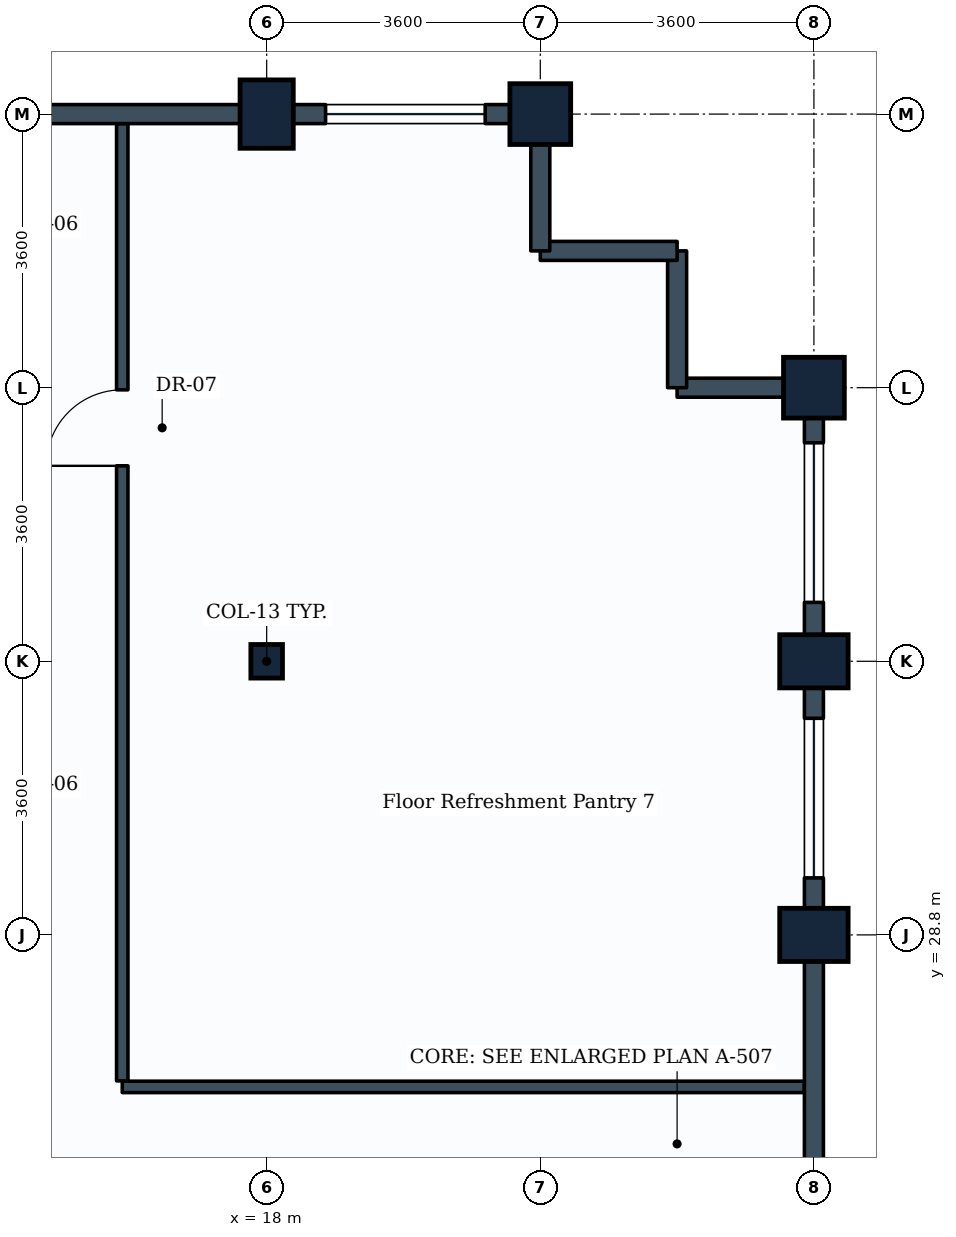
"""IFC4 building model, lengths in metres.
Left out: names, types, materials, properties, quantities, classifications, styles, units other than length and angle.
Written with IfcOpenShell. Run it as: python <this file> out.ifc"""

import sys

from ifc_helpers import new_model, si_unit, direction, frame, frame_2d, origin, origin_2d, place, context, subcontext, project, spatial, rectangle, i_section, extrude, element, fill, save


model = new_model("IFC4")
c1 = context("Model", 3, precision=1e-05, world=origin(), true_north=direction((0.0, 1.0)))
c2 = subcontext(c1, "Body", "Model", "MODEL_VIEW")
j1 = project(units=[si_unit("LENGTHUNIT", "METRE"), si_unit("PLANEANGLEUNIT", "RADIAN")], contexts=[c1])
p1 = place(None, origin())
s1 = spatial("IfcSite", under=j1, at=p1, CompositionType="ELEMENT")
p2 = place(p1, origin())
s2 = spatial("IfcBuilding", under=s1, at=p2, CompositionType="ELEMENT")
p3 = place(p2, frame((0.0, 0.0, 186.2)))
s3 = spatial("IfcBuildingStorey", under=s2, at=p3, CompositionType="ELEMENT", Elevation=186.2)
p4 = place(p3, frame((18.0, 32.4, 0.0), z_axis=(0.0, 0.0, 1.0), x_axis=(1.0, 0.0, 0.0)))
e1 = element("IfcColumn", 1, at=p4, inside=s3, PredefinedType="COLUMN", context=c2, shape_type="SweptSolid", body=[
    extrude(i_section(OverallWidth=0.416, OverallDepth=0.442, WebThickness=0.025, FlangeThickness=0.041, FilletRadius=0.015, at=origin_2d()), origin(), (0.0, 0.0, 1.0), 3.8),
])
p5 = place(p3, frame((18.0, 39.6, 0.0), z_axis=(0.0, 0.0, 1.0), x_axis=(1.0, 0.0, 0.0)))
e2 = element("IfcColumn", 2, at=p5, inside=s3, PredefinedType="COLUMN", context=c2, shape_type="SweptSolid", body=[
    extrude(rectangle(XDim=0.7, YDim=0.9, at=origin_2d()), origin(), (0.0, 0.0, 1.0), 3.8),
])
p6 = place(p3, frame((21.6, 39.6, 0.0), z_axis=(0.0, 0.0, 1.0), x_axis=(1.0, 0.0, 0.0)))
e3 = element("IfcColumn", 3, at=p6, inside=s3, PredefinedType="COLUMN", context=c2, shape_type="SweptSolid", body=[
    extrude(rectangle(XDim=0.8, YDim=0.8, at=origin_2d()), origin(), (0.0, 0.0, 1.0), 3.8),
])
for number, where, z_axis, x_axis in (
    (4, (25.2, 28.8, 0.0), (0.0, 0.0, 1.0), (0.0, 1.0, 0.0)),
    (5, (25.2, 32.4, 0.0), (0.0, 0.0, 1.0), (0.0, 1.0, 0.0)),
):
    element("IfcColumn", number, at=place(p3, frame(where, z_axis=z_axis, x_axis=x_axis)), inside=s3, PredefinedType="COLUMN", context=c2, shape_type="SweptSolid", body=[
        extrude(rectangle(XDim=0.7, YDim=0.9, at=origin_2d()), origin(), (0.0, 0.0, 1.0), 3.8),
    ])
p7 = place(p3, frame((25.2, 36.0, 0.0), z_axis=(0.0, 0.0, 1.0), x_axis=(0.0, 1.0, 0.0)))
e6 = element("IfcColumn", 6, at=p7, inside=s3, PredefinedType="COLUMN", context=c2, shape_type="SweptSolid", body=[
    extrude(rectangle(XDim=0.8, YDim=0.8, at=origin_2d()), origin(), (0.0, 0.0, 1.0), 3.8),
])
p8 = place(p3, frame((25.2, 25.2, 0.0), z_axis=(0.0, 0.0, 1.0), x_axis=(0.0, 1.0, 0.0)))
e7 = element("IfcWall", 7, at=p8, inside=s3, PredefinedType="STANDARD", context=c2, shape_type="SweptSolid", body=[
    extrude(rectangle(XDim=3.6, YDim=0.25, at=frame_2d((1.8, 0.0))), origin(), (0.0, 0.0, 1.0), 2.93),
])
p9 = place(p3, frame((25.2, 28.8, 0.0), z_axis=(0.0, 0.0, 1.0), x_axis=(0.0, 1.0, 0.0)))
e8 = element("IfcWall", 8, at=p9, inside=s3, PredefinedType="STANDARD", context=c2, shape_type="SweptSolid", body=[
    extrude(rectangle(XDim=3.6, YDim=0.25, at=frame_2d((1.8, 0.0))), origin(), (0.0, 0.0, 1.0), 2.93),
])
p10 = place(p9, frame((0.75, 0.0, 0.85)))
e9 = element("IfcOpeningElement", 9, at=p10, cuts=e8, PredefinedType="OPENING", context=c2, shape_type="SweptSolid", body=[
    extrude(rectangle(XDim=2.1, YDim=1.35, at=frame_2d((1.05, 0.675))), frame((0.0, 0.135, 0.0), z_axis=(0.0, -1.0, 0.0), x_axis=(1.0, 0.0, 0.0)), (0.0, 0.0, 1.0), 0.27),
])
p11 = place(p3, frame((25.2, 32.4, 0.0), z_axis=(0.0, 0.0, 1.0), x_axis=(0.0, 1.0, 0.0)))
e10 = element("IfcWall", 10, at=p11, inside=s3, PredefinedType="STANDARD", context=c2, shape_type="SweptSolid", body=[
    extrude(rectangle(XDim=3.6, YDim=0.25, at=frame_2d((1.8, 0.0))), origin(), (0.0, 0.0, 1.0), 2.93),
])
p12 = place(p11, frame((0.775, 0.0, 0.85)))
e11 = element("IfcOpeningElement", 11, at=p12, cuts=e10, PredefinedType="OPENING", context=c2, shape_type="SweptSolid", body=[
    extrude(rectangle(XDim=2.1, YDim=1.35, at=frame_2d((1.05, 0.675))), frame((0.0, 0.135, 0.0), z_axis=(0.0, -1.0, 0.0), x_axis=(1.0, 0.0, 0.0)), (0.0, 0.0, 1.0), 0.27),
])
p13 = place(p3, frame((23.4, 36.0, 0.0), z_axis=(0.0, 0.0, 1.0), x_axis=(1.0, 0.0, 0.0)))
e12 = element("IfcWall", 12, at=p13, inside=s3, PredefinedType="STANDARD", context=c2, shape_type="SweptSolid", body=[
    extrude(rectangle(XDim=1.8, YDim=0.25, at=frame_2d((0.9, 0.0))), origin(), (0.0, 0.0, 1.0), 2.93),
])
p14 = place(p3, frame((23.4, 36.0, 0.0), z_axis=(0.0, 0.0, 1.0), x_axis=(0.0, 1.0, 0.0)))
e13 = element("IfcWall", 13, at=p14, inside=s3, PredefinedType="STANDARD", context=c2, shape_type="SweptSolid", body=[
    extrude(rectangle(XDim=1.8, YDim=0.25, at=frame_2d((0.9, 0.0))), origin(), (0.0, 0.0, 1.0), 3.535),
])
p15 = place(p3, frame((21.6, 37.8, 0.0), z_axis=(0.0, 0.0, 1.0), x_axis=(1.0, 0.0, 0.0)))
e14 = element("IfcWall", 14, at=p15, inside=s3, PredefinedType="STANDARD", context=c2, shape_type="SweptSolid", body=[
    extrude(rectangle(XDim=1.8, YDim=0.25, at=frame_2d((0.9, 0.0))), origin(), (0.0, 0.0, 1.0), 3.535),
])
p16 = place(p3, frame((21.6, 37.8, 0.0), z_axis=(0.0, 0.0, 1.0), x_axis=(0.0, 1.0, 0.0)))
e15 = element("IfcWall", 15, at=p16, inside=s3, PredefinedType="STANDARD", context=c2, shape_type="SweptSolid", body=[
    extrude(rectangle(XDim=1.8, YDim=0.25, at=frame_2d((0.9, 0.0))), origin(), (0.0, 0.0, 1.0), 2.93),
])
p17 = place(p3, frame((18.0, 39.6, 0.0), z_axis=(0.0, 0.0, 1.0), x_axis=(1.0, 0.0, 0.0)))
e16 = element("IfcWall", 16, at=p17, inside=s3, PredefinedType="STANDARD", context=c2, shape_type="SweptSolid", body=[
    extrude(rectangle(XDim=3.6, YDim=0.25, at=frame_2d((1.8, 0.0))), origin(), (0.0, 0.0, 1.0), 2.93),
])
p18 = place(p17, frame((0.775, 0.0, 0.85)))
e17 = element("IfcOpeningElement", 17, at=p18, cuts=e16, PredefinedType="OPENING", context=c2, shape_type="SweptSolid", body=[
    extrude(rectangle(XDim=2.1, YDim=1.35, at=frame_2d((1.05, 0.675))), frame((0.0, 0.135, 0.0), z_axis=(0.0, -1.0, 0.0), x_axis=(1.0, 0.0, 0.0)), (0.0, 0.0, 1.0), 0.27),
])
p19 = place(p3, frame((14.4, 39.6, 0.0), z_axis=(0.0, 0.0, 1.0), x_axis=(1.0, 0.0, 0.0)))
e18 = element("IfcWall", 18, at=p19, inside=s3, PredefinedType="STANDARD", context=c2, shape_type="SweptSolid", body=[
    extrude(rectangle(XDim=3.6, YDim=0.25, at=frame_2d((1.8, 0.0))), origin(), (0.0, 0.0, 1.0), 2.93),
])
p20 = place(p3, frame((16.1, 26.8, 0.0), z_axis=(0.0, 0.0, 1.0), x_axis=(1.0, 0.0, 0.0)))
e19 = element("IfcWall", 19, at=p20, inside=s3, PredefinedType="PARTITIONING", context=c2, shape_type="SweptSolid", body=[
    extrude(rectangle(XDim=8.971, YDim=0.15, at=frame_2d((4.485, 0.0))), origin(), (0.0, 0.0, 1.0), 2.93),
])
p21 = place(p3, frame((16.1, 26.879, 0.0), z_axis=(0.0, 0.0, 1.0), x_axis=(0.0, 1.0, 0.0)))
e20 = element("IfcWall", 20, at=p21, inside=s3, PredefinedType="PARTITIONING", context=c2, shape_type="SweptSolid", body=[
    extrude(rectangle(XDim=12.592, YDim=0.15, at=frame_2d((6.296, 0.0))), origin(), (0.0, 0.0, 1.0), 2.93),
])
p22 = place(p21, frame((8.093, 0.0, 0.0)))
e21 = element("IfcOpeningElement", 21, at=p22, cuts=e20, PredefinedType="OPENING", context=c2, shape_type="SweptSolid", body=[
    extrude(rectangle(XDim=1.0, YDim=2.1, at=frame_2d((0.5, 1.05))), frame((0.0, 0.085, 0.0), z_axis=(0.0, -1.0, 0.0), x_axis=(1.0, 0.0, 0.0)), (0.0, 0.0, 1.0), 0.17),
])
p23 = place(p10, origin())
e22 = element("IfcWindow", 22, at=p23, inside=s3, PartitioningType="SINGLE_PANEL", PredefinedType="WINDOW", context=c2, shape_type="SweptSolid", body=[
    extrude(rectangle(XDim=2.1, YDim=1.35, at=frame_2d((1.05, 0.675))), frame((0.0, 0.03, 0.0), z_axis=(0.0, -1.0, 0.0), x_axis=(1.0, 0.0, 0.0)), (0.0, 0.0, 1.0), 0.06),
])
fill(e9, e22)
p24 = place(p12, origin())
e23 = element("IfcWindow", 23, at=p24, inside=s3, PartitioningType="SINGLE_PANEL", PredefinedType="WINDOW", context=c2, shape_type="SweptSolid", body=[
    extrude(rectangle(XDim=2.1, YDim=1.35, at=frame_2d((1.05, 0.675))), frame((0.0, 0.03, 0.0), z_axis=(0.0, -1.0, 0.0), x_axis=(1.0, 0.0, 0.0)), (0.0, 0.0, 1.0), 0.06),
])
fill(e11, e23)
p25 = place(p18, origin())
e24 = element("IfcWindow", 24, at=p25, inside=s3, PartitioningType="SINGLE_PANEL", PredefinedType="WINDOW", context=c2, shape_type="SweptSolid", body=[
    extrude(rectangle(XDim=2.1, YDim=1.35, at=frame_2d((1.05, 0.675))), frame((0.0, 0.03, 0.0), z_axis=(0.0, -1.0, 0.0), x_axis=(1.0, 0.0, 0.0)), (0.0, 0.0, 1.0), 0.06),
])
fill(e17, e24)
p26 = place(p22, origin())
e25 = element("IfcDoor", 25, at=p26, inside=s3, OperationType="SINGLE_SWING_LEFT", PredefinedType="DOOR", context=c2, shape_type="SweptSolid", body=[
    extrude(rectangle(XDim=1.0, YDim=2.1, at=frame_2d((0.5, 1.05))), frame((0.0, 0.025, 0.0), z_axis=(0.0, -1.0, 0.0), x_axis=(1.0, 0.0, 0.0)), (0.0, 0.0, 1.0), 0.05),
])
fill(e21, e25)
save(model, sys.argv[1])
